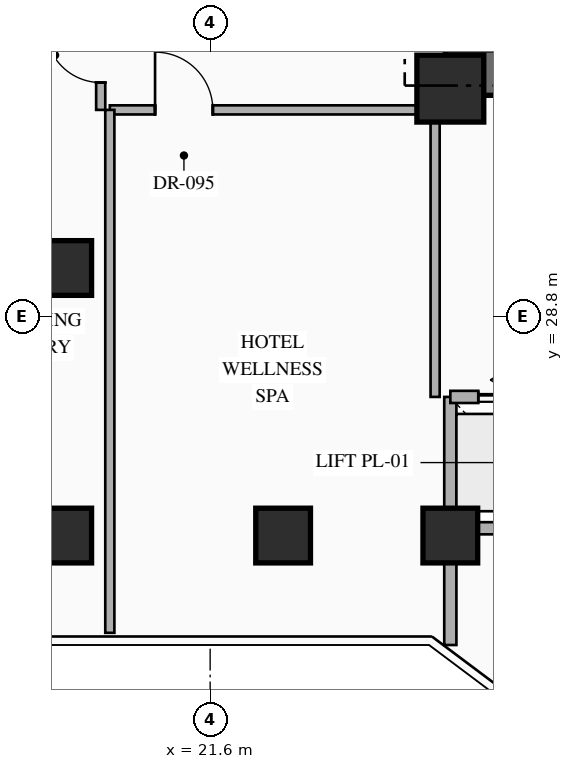
"""IFC4 building model, lengths in metres.
Left out: names, types, materials, properties, quantities, classifications, styles, units other than length and angle.
Written with IfcOpenShell. Run it as: python <this file> out.ifc"""

import sys

from ifc_helpers import new_model, si_unit, direction, frame, frame_2d, origin, origin_2d, place, context, subcontext, project, spatial, rectangle, hollow_rectangle, extrude, element, fill, save


model = new_model("IFC4")
c1 = context("Model", 3, precision=1e-05, world=origin(), true_north=direction((0.0, 1.0)))
c2 = subcontext(c1, "Body", "Model", "MODEL_VIEW")
j1 = project(units=[si_unit("LENGTHUNIT", "METRE"), si_unit("PLANEANGLEUNIT", "RADIAN")], contexts=[c1])
p1 = place(None, origin())
s1 = spatial("IfcSite", under=j1, at=p1, CompositionType="ELEMENT")
p2 = place(p1, origin())
s2 = spatial("IfcBuilding", under=s1, at=p2, CompositionType="ELEMENT")
p3 = place(p2, frame((0.0, 0.0, 70.1)))
s3 = spatial("IfcBuildingStorey", under=s2, at=p3, CompositionType="ELEMENT", Elevation=70.1)
p4 = place(p3, frame((25.47, 32.815, 0.0), z_axis=(0.0, 0.0, 1.0), x_axis=(1.0, 0.0, 0.0)))
e1 = element("IfcWall", 1, at=p4, inside=s3, PredefinedType="SHEAR", context=c2, shape_type="SweptSolid", body=[
    extrude(rectangle(XDim=8.08, YDim=0.75, at=frame_2d((4.04, 0.0))), origin(), (0.0, 0.0, 1.0), 4.5),
])
p5 = place(p4, frame((2.98, 0.0, 0.0)))
e2 = element("IfcOpeningElement", 2, at=p5, cuts=e1, PredefinedType="OPENING", context=c2, shape_type="SweptSolid", body=[
    extrude(rectangle(XDim=1.1, YDim=2.2, at=frame_2d((0.55, 1.1))), frame((0.0, 0.385, 0.0), z_axis=(0.0, -1.0, 0.0), x_axis=(1.0, 0.0, 0.0)), (0.0, 0.0, 1.0), 0.77),
])
p6 = place(p4, frame((5.73, 0.0, 0.0)))
e3 = element("IfcOpeningElement", 3, at=p6, cuts=e1, PredefinedType="OPENING", context=c2, shape_type="SweptSolid", body=[
    extrude(rectangle(XDim=1.1, YDim=2.15, at=frame_2d((0.55, 1.075))), frame((0.0, 0.385, 0.0), z_axis=(0.0, -1.0, 0.0), x_axis=(1.0, 0.0, 0.0)), (0.0, 0.0, 1.0), 0.77),
])
p7 = place(p3, frame((25.55, 32.55, 0.0), z_axis=(0.0, 0.0, 1.0), x_axis=(1.0, 0.0, 0.0)))
e4 = element("IfcColumn", 4, at=p7, inside=s3, PredefinedType="COLUMN", context=c2, shape_type="SweptSolid", body=[
    extrude(rectangle(XDim=1.1, YDim=1.1, at=origin_2d()), origin(), (0.0, 0.0, 1.0), 4.5),
])
for number, where, z_axis, x_axis in (
    (5, (25.55, 25.2, 0.0), (0.0, 0.0, 1.0), (1.0, 0.0, 0.0)),
    (6, (19.2, 25.2, 0.0), (0.0, 0.0, 1.0), (1.0, 0.0, 0.0)),
    (7, (19.2, 29.6, 0.0), (0.0, 0.0, 1.0), (1.0, 0.0, 0.0)),
    (8, (22.8, 25.2, 0.0), (0.0, 0.0, 1.0), (1.0, 0.0, 0.0)),
):
    element("IfcColumn", number, at=place(p3, frame(where, z_axis=z_axis, x_axis=x_axis)), inside=s3, PredefinedType="COLUMN", context=c2, shape_type="SweptSolid", body=[
        extrude(hollow_rectangle(XDim=0.9, YDim=0.9, WallThickness=0.036, at=origin_2d()), origin(), (0.0, 0.0, 1.0), 4.5),
    ])
p8 = place(p3, frame((25.55, 23.4, 0.0), z_axis=(0.0, 0.0, 1.0), x_axis=(0.0, 1.0, 0.0)))
e9 = element("IfcWall", 9, at=p8, inside=s3, PredefinedType="STANDARD", context=c2, shape_type="SweptSolid", body=[
    extrude(rectangle(XDim=4.08, YDim=0.2, at=frame_2d((2.04, 0.0))), origin(), (0.0, 0.0, 1.0), 3.475),
])
p9 = place(p3, frame((25.55, 25.32, 0.0), z_axis=(0.0, 0.0, 1.0), x_axis=(1.0, 0.0, 0.0)))
e10 = element("IfcWall", 10, at=p9, inside=s3, PredefinedType="STANDARD", context=c2, shape_type="SweptSolid", body=[
    extrude(rectangle(XDim=7.88, YDim=0.2, at=frame_2d((3.94, 0.0))), origin(), (0.0, 0.0, 1.0), 3.675),
])
p10 = place(p3, frame((25.55, 27.48, 0.0), z_axis=(0.0, 0.0, 1.0), x_axis=(1.0, 0.0, 0.0)))
e11 = element("IfcWall", 11, at=p10, inside=s3, PredefinedType="STANDARD", context=c2, shape_type="SweptSolid", body=[
    extrude(rectangle(XDim=7.88, YDim=0.2, at=frame_2d((3.94, 0.0))), origin(), (0.0, 0.0, 1.0), 4.28),
])
p11 = place(p10, frame((0.46, 0.0, 0.0)))
e12 = element("IfcOpeningElement", 12, at=p11, cuts=e11, PredefinedType="OPENING", context=c2, shape_type="SweptSolid", body=[
    extrude(rectangle(XDim=1.08, YDim=2.15, at=frame_2d((0.54, 1.075))), frame((0.0, 0.11, 0.0), z_axis=(0.0, -1.0, 0.0), x_axis=(1.0, 0.0, 0.0)), (0.0, 0.0, 1.0), 0.22),
])
p12 = place(p10, frame((2.42, 0.0, 0.0)))
e13 = element("IfcOpeningElement", 13, at=p12, cuts=e11, PredefinedType="OPENING", context=c2, shape_type="SweptSolid", body=[
    extrude(rectangle(XDim=1.08, YDim=2.15, at=frame_2d((0.54, 1.075))), frame((0.0, 0.11, 0.0), z_axis=(0.0, -1.0, 0.0), x_axis=(1.0, 0.0, 0.0)), (0.0, 0.0, 1.0), 0.22),
])
p13 = place(p10, frame((4.38, 0.0, 0.0)))
e14 = element("IfcOpeningElement", 14, at=p13, cuts=e11, PredefinedType="OPENING", context=c2, shape_type="SweptSolid", body=[
    extrude(rectangle(XDim=1.08, YDim=2.15, at=frame_2d((0.54, 1.075))), frame((0.0, 0.11, 0.0), z_axis=(0.0, -1.0, 0.0), x_axis=(1.0, 0.0, 0.0)), (0.0, 0.0, 1.0), 0.22),
])
p14 = place(p10, frame((6.34, 0.0, 0.0)))
e15 = element("IfcOpeningElement", 15, at=p14, cuts=e11, PredefinedType="OPENING", context=c2, shape_type="SweptSolid", body=[
    extrude(rectangle(XDim=1.08, YDim=2.15, at=frame_2d((0.54, 1.075))), frame((0.0, 0.11, 0.0), z_axis=(0.0, -1.0, 0.0), x_axis=(1.0, 0.0, 0.0)), (0.0, 0.0, 1.0), 0.22),
])
p15 = place(p3, frame((19.95, 32.2, 0.0), z_axis=(0.0, 0.0, 1.0), x_axis=(1.0, 0.0, 0.0)))
e16 = element("IfcWall", 16, at=p15, inside=s3, PredefinedType="PARTITIONING", context=c2, shape_type="SweptSolid", body=[
    extrude(rectangle(XDim=5.35, YDim=0.15, at=frame_2d((2.675, 0.0))), origin(), (0.0, 0.0, 1.0), 4.28),
])
p16 = place(p15, frame((0.744, 0.0, 0.0)))
e17 = element("IfcOpeningElement", 17, at=p16, cuts=e16, PredefinedType="OPENING", context=c2, shape_type="SweptSolid", body=[
    extrude(rectangle(XDim=0.95, YDim=2.15, at=frame_2d((0.475, 1.075))), frame((0.0, 0.085, 0.0), z_axis=(0.0, -1.0, 0.0), x_axis=(1.0, 0.0, 0.0)), (0.0, 0.0, 1.0), 0.17),
])
p17 = place(p3, frame((19.95, 23.6, 0.0), z_axis=(0.0, 0.0, 1.0), x_axis=(0.0, 1.0, 0.0)))
e18 = element("IfcWall", 18, at=p17, inside=s3, PredefinedType="PARTITIONING", context=c2, shape_type="SweptSolid", body=[
    extrude(rectangle(XDim=8.6, YDim=0.15, at=frame_2d((4.3, 0.0))), origin(), (0.0, 0.0, 1.0), 4.28),
])
p18 = place(p3, frame((25.3, 27.48, 0.0), z_axis=(0.0, 0.0, 1.0), x_axis=(0.0, 1.0, 0.0)))
e19 = element("IfcWall", 19, at=p18, inside=s3, PredefinedType="PARTITIONING", context=c2, shape_type="SweptSolid", body=[
    extrude(rectangle(XDim=4.72, YDim=0.15, at=frame_2d((2.36, 0.0))), origin(), (0.0, 0.0, 1.0), 3.475),
])
p19 = place(p3, frame((19.8, 32.2, 0.0), z_axis=(0.0, 0.0, 1.0), x_axis=(0.0, 1.0, 0.0)))
e20 = element("IfcWall", 20, at=p19, inside=s3, PredefinedType="PARTITIONING", context=c2, shape_type="SweptSolid", body=[
    extrude(rectangle(XDim=1.8, YDim=0.15, at=frame_2d((0.9, 0.0))), origin(), (0.0, 0.0, 1.0), 4.28),
])
p20 = place(p19, frame((0.45, 0.0, 0.0)))
e21 = element("IfcOpeningElement", 21, at=p20, cuts=e20, PredefinedType="OPENING", context=c2, shape_type="SweptSolid", body=[
    extrude(rectangle(XDim=0.9, YDim=2.15, at=frame_2d((0.45, 1.075))), frame((0.0, 0.085, 0.0), z_axis=(0.0, -1.0, 0.0), x_axis=(1.0, 0.0, 0.0)), (0.0, 0.0, 1.0), 0.17),
])
p21 = place(p11, origin())
e22 = element("IfcDoor", 22, at=p21, inside=s3, OperationType="SLIDING_TO_LEFT", PredefinedType="USERDEFINED", context=c2, shape_type="SweptSolid", body=[
    extrude(rectangle(XDim=1.08, YDim=2.15, at=frame_2d((0.54, 1.075))), frame((0.0, 0.025, 0.0), z_axis=(0.0, -1.0, 0.0), x_axis=(1.0, 0.0, 0.0)), (0.0, 0.0, 1.0), 0.05),
])
fill(e12, e22)
p22 = place(p16, origin())
e23 = element("IfcDoor", 23, at=p22, inside=s3, OperationType="SINGLE_SWING_LEFT", PredefinedType="DOOR", context=c2, shape_type="SweptSolid", body=[
    extrude(rectangle(XDim=0.95, YDim=2.15, at=frame_2d((0.475, 1.075))), frame((0.0, 0.025, 0.0), z_axis=(0.0, -1.0, 0.0), x_axis=(1.0, 0.0, 0.0)), (0.0, 0.0, 1.0), 0.05),
])
fill(e17, e23)
p23 = place(p20, origin())
e24 = element("IfcDoor", 24, at=p23, inside=s3, OperationType="SINGLE_SWING_RIGHT", PredefinedType="DOOR", context=c2, shape_type="SweptSolid", body=[
    extrude(rectangle(XDim=0.9, YDim=2.15, at=frame_2d((0.45, 1.075))), frame((0.0, 0.025, 0.0), z_axis=(0.0, -1.0, 0.0), x_axis=(1.0, 0.0, 0.0)), (0.0, 0.0, 1.0), 0.05),
])
fill(e21, e24)
save(model, sys.argv[1])
